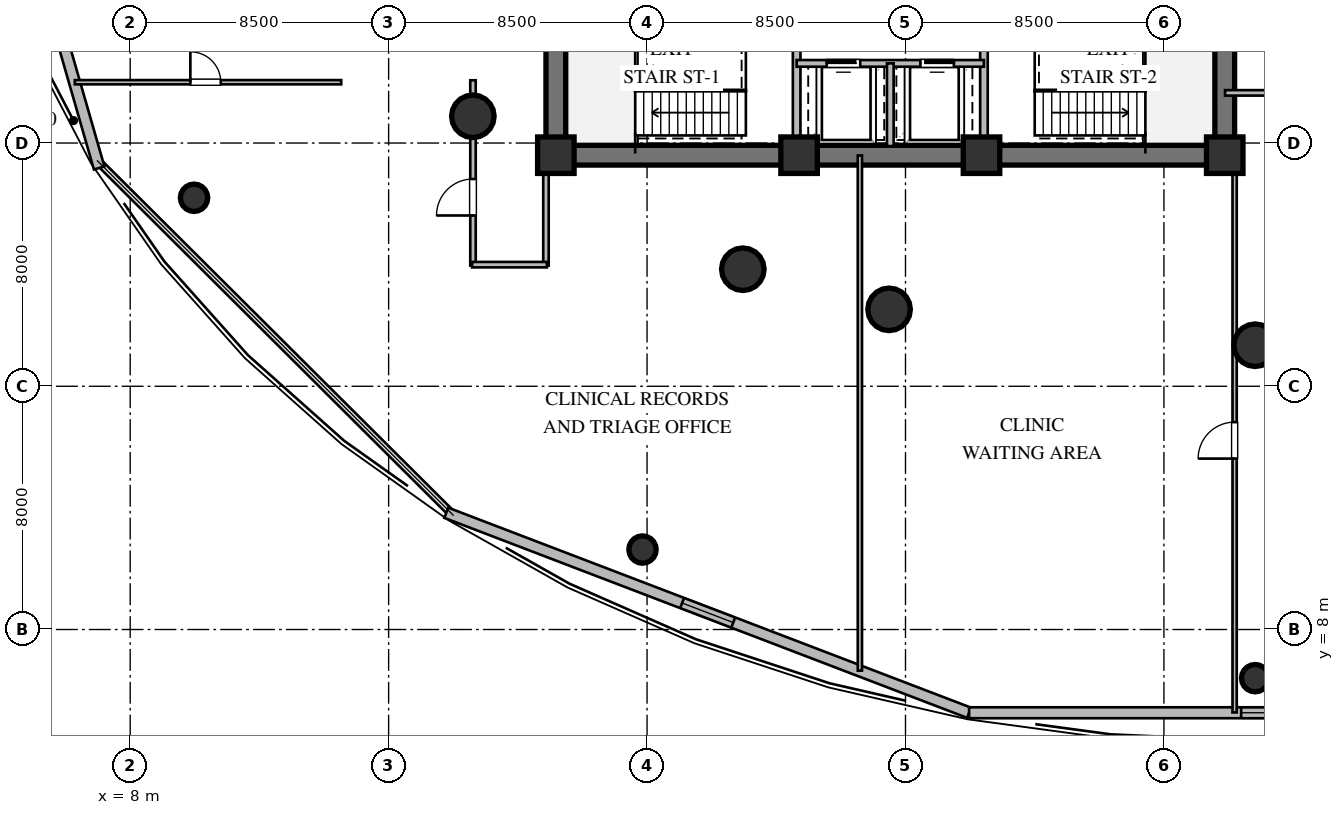
"""IFC4 building model, lengths in metres.
Left out: names, types, materials, properties, quantities, classifications, styles, units other than length and angle.
Written with IfcOpenShell. Run it as: python <this file> out.ifc"""

import sys

from ifc_helpers import new_model, si_unit, direction, frame, frame_2d, origin, origin_2d, place, context, subcontext, project, spatial, rectangle, circle, extrude, element, fill, save


model = new_model("IFC4")
c1 = context("Model", 3, precision=1e-05, world=origin(), true_north=direction((0.0, 1.0)))
c2 = subcontext(c1, "Body", "Model", "MODEL_VIEW")
j1 = project(units=[si_unit("LENGTHUNIT", "METRE"), si_unit("PLANEANGLEUNIT", "RADIAN")], contexts=[c1])
p1 = place(None, origin())
s1 = spatial("IfcSite", under=j1, at=p1, CompositionType="ELEMENT")
p2 = place(p1, origin())
s2 = spatial("IfcBuilding", under=s1, at=p2, CompositionType="ELEMENT")
p3 = place(p2, frame((0.0, 0.0, 14.4)))
s3 = spatial("IfcBuildingStorey", under=s2, at=p3, CompositionType="ELEMENT", Elevation=14.4)
p4 = place(p3, frame((21.675, 23.6, 0.0), z_axis=(0.0, 0.0, 1.0), x_axis=(1.0, 0.0, 0.0)))
e1 = element("IfcWall", 1, at=p4, inside=s3, PredefinedType="SHEAR", context=c2, shape_type="SweptSolid", body=[
    extrude(rectangle(XDim=22.65, YDim=0.65, at=frame_2d((11.325, 0.0))), origin(), (0.0, 0.0, 1.0), 4.52),
])
p5 = place(p3, frame((22.0, 23.925, 0.0), z_axis=(0.0, 0.0, 1.0), x_axis=(0.0, 1.0, 0.0)))
e2 = element("IfcWall", 2, at=p5, inside=s3, PredefinedType="SHEAR", context=c2, shape_type="SweptSolid", body=[
    extrude(rectangle(XDim=12.15, YDim=0.65, at=frame_2d((6.075, 0.0))), origin(), (0.0, 0.0, 1.0), 4.52),
])
p6 = place(p3, frame((44.0, 23.925, 0.0), z_axis=(0.0, 0.0, 1.0), x_axis=(0.0, 1.0, 0.0)))
e3 = element("IfcWall", 3, at=p6, inside=s3, PredefinedType="SHEAR", context=c2, shape_type="SweptSolid", body=[
    extrude(rectangle(XDim=12.15, YDim=0.65, at=frame_2d((6.075, 0.0))), origin(), (0.0, 0.0, 1.0), 4.52),
])
p7 = place(p6, frame((8.775, 0.0, 0.0)))
e4 = element("IfcOpeningElement", 4, at=p7, cuts=e3, PredefinedType="OPENING", context=c2, shape_type="SweptSolid", body=[
    extrude(rectangle(XDim=1.5, YDim=2.15, at=frame_2d((0.75, 1.075))), frame((0.0, 0.335, 0.0), z_axis=(0.0, -1.0, 0.0), x_axis=(1.0, 0.0, 0.0)), (0.0, 0.0, 1.0), 0.67),
])
for number, where, z_axis, x_axis in (
    (5, (22.0, 23.6, 0.0), (0.0, 0.0, 1.0), (1.0, 0.0, 0.0)),
    (6, (30.0, 23.6, 0.0), (0.0, 0.0, 1.0), (1.0, 0.0, 0.0)),
    (7, (36.0, 23.6, 0.0), (0.0, 0.0, 1.0), (1.0, 0.0, 0.0)),
    (8, (44.0, 23.6, 0.0), (0.0, 0.0, 1.0), (1.0, 0.0, 0.0)),
):
    element("IfcColumn", number, at=place(p3, frame(where, z_axis=z_axis, x_axis=x_axis)), inside=s3, PredefinedType="COLUMN", context=c2, shape_type="SweptSolid", body=[
        extrude(rectangle(XDim=1.2, YDim=1.2, at=origin_2d()), origin(), (0.0, 0.0, 1.0), 4.8),
    ])
for number, where, z_axis, x_axis in (
    (9, (19.27, 24.88, 0.0), (0.0, 0.0, 1.0), (1.0, 0.0, 0.0)),
    (10, (28.15, 19.85, 0.0), (0.0, 0.0, 1.0), (1.0, 0.0, 0.0)),
    (11, (32.96, 18.53, 0.0), (0.0, 0.0, 1.0), (1.0, 0.0, 0.0)),
    (12, (45.0, 17.35, 0.0), (0.0, 0.0, 1.0), (1.0, 0.0, 0.0)),
):
    element("IfcColumn", number, at=place(p3, frame(where, z_axis=z_axis, x_axis=x_axis)), inside=s3, PredefinedType="COLUMN", context=c2, shape_type="SweptSolid", body=[
        extrude(circle(Radius=0.7, at=origin_2d()), origin(), (0.0, 0.0, 1.0), 4.8),
    ])
for number, where, z_axis, x_axis in (
    (13, (10.1, 22.2, 0.0), (0.0, 0.0, 1.0), (1.0, 0.0, 0.0)),
    (14, (24.85, 10.63, 0.0), (0.0, 0.0, 1.0), (1.0, 0.0, 0.0)),
    (15, (45.0, 6.4, 0.0), (0.0, 0.0, 1.0), (1.0, 0.0, 0.0)),
):
    element("IfcColumn", number, at=place(p3, frame(where, z_axis=z_axis, x_axis=x_axis)), inside=s3, PredefinedType="COLUMN", context=c2, shape_type="SweptSolid", body=[
        extrude(circle(Radius=0.45, at=origin_2d()), origin(), (0.0, 0.0, 1.0), 4.8),
    ])
p8 = place(p3, frame((2.72, 38.0, 0.0), z_axis=(0.0, 0.0, 1.0), x_axis=(0.276203409751, -0.961099202186, 0.0)))
e16 = element("IfcWall", 16, at=p8, inside=s3, PredefinedType="STANDARD", context=c2, shape_type="SweptSolid", body=[
    extrude(rectangle(XDim=15.42, YDim=0.36, at=frame_2d((7.71, 0.0))), origin(), (0.0, 0.0, 1.0), 4.52),
])
p9 = place(p8, frame((6.81, 0.0, 1.05)))
e17 = element("IfcOpeningElement", 17, at=p9, cuts=e16, PredefinedType="OPENING", context=c2, shape_type="SweptSolid", body=[
    extrude(rectangle(XDim=1.8, YDim=1.7, at=frame_2d((0.9, 0.85))), frame((0.0, 0.19, 0.0), z_axis=(0.0, -1.0, 0.0), x_axis=(1.0, 0.0, 0.0)), (0.0, 0.0, 1.0), 0.38),
])
p10 = place(p3, frame((18.396, 11.839, 0.0), z_axis=(0.0, 0.0, 1.0), x_axis=(0.934012147289, -0.357241247221, 0.0)))
e18 = element("IfcWall", 18, at=p10, inside=s3, PredefinedType="STANDARD", context=c2, shape_type="SweptSolid", body=[
    extrude(rectangle(XDim=18.411, YDim=0.36, at=frame_2d((9.206, 0.0))), origin(), (0.0, 0.0, 1.0), 4.52),
])
p11 = place(p10, frame((8.305, 0.0, 1.05)))
e19 = element("IfcOpeningElement", 19, at=p11, cuts=e18, PredefinedType="OPENING", context=c2, shape_type="SweptSolid", body=[
    extrude(rectangle(XDim=1.8, YDim=1.7, at=frame_2d((0.9, 0.85))), frame((0.0, 0.19, 0.0), z_axis=(0.0, -1.0, 0.0), x_axis=(1.0, 0.0, 0.0)), (0.0, 0.0, 1.0), 0.38),
])
p12 = place(p3, frame((35.592, 5.262, 0.0), z_axis=(0.0, 0.0, 1.0), x_axis=(1.0, 0.0, 0.0)))
e20 = element("IfcWall", 20, at=p12, inside=s3, PredefinedType="STANDARD", context=c2, shape_type="SweptSolid", body=[
    extrude(rectangle(XDim=18.816, YDim=0.36, at=frame_2d((9.408, 0.0))), origin(), (0.0, 0.0, 1.0), 4.52),
])
p13 = place(p12, frame((8.948, 0.0, 1.05)))
e21 = element("IfcOpeningElement", 21, at=p13, cuts=e20, PredefinedType="OPENING", context=c2, shape_type="SweptSolid", body=[
    extrude(rectangle(XDim=1.8, YDim=1.7, at=frame_2d((0.9, 0.85))), frame((0.0, 0.19, 0.0), z_axis=(0.0, -1.0, 0.0), x_axis=(1.0, 0.0, 0.0)), (0.0, 0.0, 1.0), 0.38),
])
p14 = place(p3, frame((29.92, 23.9, 0.0), z_axis=(0.0, 0.0, 1.0), x_axis=(0.0, 1.0, 0.0)))
e22 = element("IfcWall", 22, at=p14, inside=s3, PredefinedType="SOLIDWALL", context=c2, shape_type="SweptSolid", body=[
    extrude(rectangle(XDim=5.4, YDim=0.25, at=frame_2d((2.7, 0.0))), origin(), (0.0, 0.0, 1.0), 4.52),
])
p15 = place(p14, frame((3.421, 0.0, 0.0)))
e23 = element("IfcOpeningElement", 23, at=p15, cuts=e22, PredefinedType="OPENING", context=c2, shape_type="SweptSolid", body=[
    extrude(rectangle(XDim=1.15, YDim=2.1, at=frame_2d((0.575, 1.05))), frame((0.0, 0.135, 0.0), z_axis=(0.0, -1.0, 0.0), x_axis=(1.0, 0.0, 0.0)), (0.0, 0.0, 1.0), 0.27),
])
p16 = place(p3, frame((36.08, 23.9, 0.0), z_axis=(0.0, 0.0, 1.0), x_axis=(0.0, 1.0, 0.0)))
e24 = element("IfcWall", 24, at=p16, inside=s3, PredefinedType="SOLIDWALL", context=c2, shape_type="SweptSolid", body=[
    extrude(rectangle(XDim=5.4, YDim=0.25, at=frame_2d((2.7, 0.0))), origin(), (0.0, 0.0, 1.0), 4.52),
])
p17 = place(p16, frame((3.421, 0.0, 0.0)))
e25 = element("IfcOpeningElement", 25, at=p17, cuts=e24, PredefinedType="OPENING", context=c2, shape_type="SweptSolid", body=[
    extrude(rectangle(XDim=1.15, YDim=2.1, at=frame_2d((0.575, 1.05))), frame((0.0, 0.135, 0.0), z_axis=(0.0, -1.0, 0.0), x_axis=(1.0, 0.0, 0.0)), (0.0, 0.0, 1.0), 0.27),
])
p18 = place(p3, frame((29.92, 26.62, 0.0), z_axis=(0.0, 0.0, 1.0), x_axis=(1.0, 0.0, 0.0)))
e26 = element("IfcWall", 26, at=p18, inside=s3, PredefinedType="SOLIDWALL", context=c2, shape_type="SweptSolid", body=[
    extrude(rectangle(XDim=6.16, YDim=0.22, at=frame_2d((3.08, 0.0))), origin(), (0.0, 0.0, 1.0), 4.52),
])
p19 = place(p18, frame((0.99, 0.0, 0.0)))
e27 = element("IfcOpeningElement", 27, at=p19, cuts=e26, PredefinedType="OPENING", context=c2, shape_type="SweptSolid", body=[
    extrude(rectangle(XDim=1.1, YDim=2.1, at=frame_2d((0.55, 1.05))), frame((0.0, 0.12, 0.0), z_axis=(0.0, -1.0, 0.0), x_axis=(1.0, 0.0, 0.0)), (0.0, 0.0, 1.0), 0.24),
])
p20 = place(p18, frame((4.07, 0.0, 0.0)))
e28 = element("IfcOpeningElement", 28, at=p20, cuts=e26, PredefinedType="OPENING", context=c2, shape_type="SweptSolid", body=[
    extrude(rectangle(XDim=1.1, YDim=2.1, at=frame_2d((0.55, 1.05))), frame((0.0, 0.12, 0.0), z_axis=(0.0, -1.0, 0.0), x_axis=(1.0, 0.0, 0.0)), (0.0, 0.0, 1.0), 0.24),
])
p21 = place(p3, frame((33.0, 23.9, 0.0), z_axis=(0.0, 0.0, 1.0), x_axis=(0.0, 1.0, 0.0)))
e29 = element("IfcWall", 29, at=p21, inside=s3, PredefinedType="SOLIDWALL", context=c2, shape_type="SweptSolid", body=[
    extrude(rectangle(XDim=2.72, YDim=0.22, at=frame_2d((1.36, 0.0))), origin(), (0.0, 0.0, 1.0), 4.52),
])
p22 = place(p3, frame((62.415, 25.65, 0.0), z_axis=(0.0, 0.0, 1.0), x_axis=(-1.0, 0.0, 0.0)))
e30 = element("IfcWall", 30, at=p22, inside=s3, PredefinedType="PARTITIONING", context=c2, shape_type="SweptSolid", body=[
    extrude(rectangle(XDim=18.405, YDim=0.18, at=frame_2d((9.203, 0.0))), origin(), (0.0, 0.0, 1.0), 4.05),
])
p23 = place(p22, frame((8.46, 0.0, 0.0)))
e31 = element("IfcOpeningElement", 31, at=p23, cuts=e30, PredefinedType="OPENING", context=c2, shape_type="SweptSolid", body=[
    extrude(rectangle(XDim=1.2, YDim=2.15, at=frame_2d((0.6, 1.075))), frame((0.0, 0.1, 0.0), z_axis=(0.0, -1.0, 0.0), x_axis=(1.0, 0.0, 0.0)), (0.0, 0.0, 1.0), 0.2),
])
p24 = place(p3, frame((19.275, 19.97, 0.0), z_axis=(0.0, 0.0, 1.0), x_axis=(0.0, 1.0, 0.0)))
e32 = element("IfcWall", 32, at=p24, inside=s3, PredefinedType="PARTITIONING", context=c2, shape_type="SweptSolid", body=[
    extrude(rectangle(XDim=6.095, YDim=0.18, at=frame_2d((3.047, 0.0))), origin(), (0.0, 0.0, 1.0), 3.898),
])
p25 = place(p24, frame((1.647, 0.0, 0.0)))
e33 = element("IfcOpeningElement", 33, at=p25, cuts=e32, PredefinedType="OPENING", context=c2, shape_type="SweptSolid", body=[
    extrude(rectangle(XDim=1.2, YDim=2.15, at=frame_2d((0.6, 1.075))), frame((0.0, 0.1, 0.0), z_axis=(0.0, -1.0, 0.0), x_axis=(1.0, 0.0, 0.0)), (0.0, 0.0, 1.0), 0.2),
])
p26 = place(p3, frame((21.675, 23.59, 0.0), z_axis=(0.0, 0.0, 1.0), x_axis=(0.0, -1.0, 0.0)))
e34 = element("IfcWall", 34, at=p26, inside=s3, PredefinedType="PARTITIONING", context=c2, shape_type="SweptSolid", body=[
    extrude(rectangle(XDim=3.62, YDim=0.18, at=frame_2d((1.81, 0.0))), origin(), (0.0, 0.0, 1.0), 3.66),
])
p27 = place(p3, frame((21.705, 20.0, 0.0), z_axis=(0.0, 0.0, 1.0), x_axis=(-1.0, 0.0, 0.0)))
e35 = element("IfcWall", 35, at=p27, inside=s3, PredefinedType="PARTITIONING", context=c2, shape_type="SweptSolid", body=[
    extrude(rectangle(XDim=2.46, YDim=0.18, at=frame_2d((1.23, 0.0))), origin(), (0.0, 0.0, 1.0), 4.52),
])
p28 = place(p3, frame((44.325, 5.272, 0.0), z_axis=(0.0, 0.0, 1.0), x_axis=(0.0, 1.0, 0.0)))
e36 = element("IfcWall", 36, at=p28, inside=s3, PredefinedType="PARTITIONING", context=c2, shape_type="SweptSolid", body=[
    extrude(rectangle(XDim=18.318, YDim=0.14, at=frame_2d((9.159, 0.0))), origin(), (0.0, 0.0, 1.0), 3.66),
])
p29 = place(p28, frame((8.349, 0.0, 0.0)))
e37 = element("IfcOpeningElement", 37, at=p29, cuts=e36, PredefinedType="OPENING", context=c2, shape_type="SweptSolid", body=[
    extrude(rectangle(XDim=1.2, YDim=2.15, at=frame_2d((0.6, 1.075))), frame((0.0, 0.08, 0.0), z_axis=(0.0, -1.0, 0.0), x_axis=(1.0, 0.0, 0.0)), (0.0, 0.0, 1.0), 0.16),
])
p30 = place(p3, frame((6.179, 26.0, 0.0), z_axis=(0.0, 0.0, 1.0), x_axis=(1.0, 0.0, 0.0)))
e38 = element("IfcWall", 38, at=p30, inside=s3, PredefinedType="PARTITIONING", context=c2, shape_type="SweptSolid", body=[
    extrude(rectangle(XDim=8.761, YDim=0.14, at=frame_2d((4.381, 0.0))), origin(), (0.0, 0.0, 1.0), 4.52),
])
p31 = place(p30, frame((3.8, 0.0, 0.0)))
e39 = element("IfcOpeningElement", 39, at=p31, cuts=e38, PredefinedType="OPENING", context=c2, shape_type="SweptSolid", body=[
    extrude(rectangle(XDim=1.0, YDim=2.1, at=frame_2d((0.5, 1.05))), frame((0.0, 0.08, 0.0), z_axis=(0.0, -1.0, 0.0), x_axis=(1.0, 0.0, 0.0)), (0.0, 0.0, 1.0), 0.16),
])
p32 = place(p3, frame((32.0, 23.59, 0.0), z_axis=(0.0, 0.0, 1.0), x_axis=(0.0, -1.0, 0.0)))
e40 = element("IfcWall", 40, at=p32, inside=s3, PredefinedType="PARTITIONING", context=c2, shape_type="SweptSolid", body=[
    extrude(rectangle(XDim=16.944, YDim=0.14, at=frame_2d((8.472, 0.0))), origin(), (0.0, 0.0, 1.0), 4.52),
])
p33 = place(p11, origin())
e41 = element("IfcWindow", 41, at=p33, inside=s3, PartitioningType="SINGLE_PANEL", PredefinedType="WINDOW", context=c2, shape_type="SweptSolid", body=[
    extrude(rectangle(XDim=1.8, YDim=1.7, at=frame_2d((0.9, 0.85))), frame((0.0, 0.03, 0.0), z_axis=(0.0, -1.0, 0.0), x_axis=(1.0, 0.0, 0.0)), (0.0, 0.0, 1.0), 0.06),
])
fill(e19, e41)
p34 = place(p13, origin())
e42 = element("IfcWindow", 42, at=p34, inside=s3, PartitioningType="SINGLE_PANEL", PredefinedType="WINDOW", context=c2, shape_type="SweptSolid", body=[
    extrude(rectangle(XDim=1.8, YDim=1.7, at=frame_2d((0.9, 0.85))), frame((0.0, 0.03, 0.0), z_axis=(0.0, -1.0, 0.0), x_axis=(1.0, 0.0, 0.0)), (0.0, 0.0, 1.0), 0.06),
])
fill(e21, e42)
p35 = place(p19, origin())
e43 = element("IfcDoor", 43, at=p35, inside=s3, OperationType="SLIDING_TO_LEFT", PredefinedType="DOOR", context=c2, shape_type="SweptSolid", body=[
    extrude(rectangle(XDim=1.1, YDim=2.1, at=frame_2d((0.55, 1.05))), frame((0.0, 0.025, 0.0), z_axis=(0.0, -1.0, 0.0), x_axis=(1.0, 0.0, 0.0)), (0.0, 0.0, 1.0), 0.05),
])
fill(e27, e43)
p36 = place(p20, origin())
e44 = element("IfcDoor", 44, at=p36, inside=s3, OperationType="SLIDING_TO_RIGHT", PredefinedType="DOOR", context=c2, shape_type="SweptSolid", body=[
    extrude(rectangle(XDim=1.1, YDim=2.1, at=frame_2d((0.55, 1.05))), frame((0.0, 0.025, 0.0), z_axis=(0.0, -1.0, 0.0), x_axis=(1.0, 0.0, 0.0)), (0.0, 0.0, 1.0), 0.05),
])
fill(e28, e44)
p37 = place(p25, origin())
e45 = element("IfcDoor", 45, at=p37, inside=s3, OperationType="SINGLE_SWING_LEFT", PredefinedType="DOOR", context=c2, shape_type="SweptSolid", body=[
    extrude(rectangle(XDim=1.2, YDim=2.15, at=frame_2d((0.6, 1.075))), frame((0.0, 0.025, 0.0), z_axis=(0.0, -1.0, 0.0), x_axis=(1.0, 0.0, 0.0)), (0.0, 0.0, 1.0), 0.05),
])
fill(e33, e45)
p38 = place(p29, origin())
e46 = element("IfcDoor", 46, at=p38, inside=s3, OperationType="SINGLE_SWING_LEFT", PredefinedType="DOOR", context=c2, shape_type="SweptSolid", body=[
    extrude(rectangle(XDim=1.2, YDim=2.15, at=frame_2d((0.6, 1.075))), frame((0.0, 0.025, 0.0), z_axis=(0.0, -1.0, 0.0), x_axis=(1.0, 0.0, 0.0)), (0.0, 0.0, 1.0), 0.05),
])
fill(e37, e46)
p39 = place(p31, origin())
e47 = element("IfcDoor", 47, at=p39, inside=s3, OperationType="SINGLE_SWING_LEFT", PredefinedType="DOOR", context=c2, shape_type="SweptSolid", body=[
    extrude(rectangle(XDim=1.0, YDim=2.1, at=frame_2d((0.5, 1.05))), frame((0.0, 0.025, 0.0), z_axis=(0.0, -1.0, 0.0), x_axis=(1.0, 0.0, 0.0)), (0.0, 0.0, 1.0), 0.05),
])
fill(e39, e47)
save(model, sys.argv[1])
